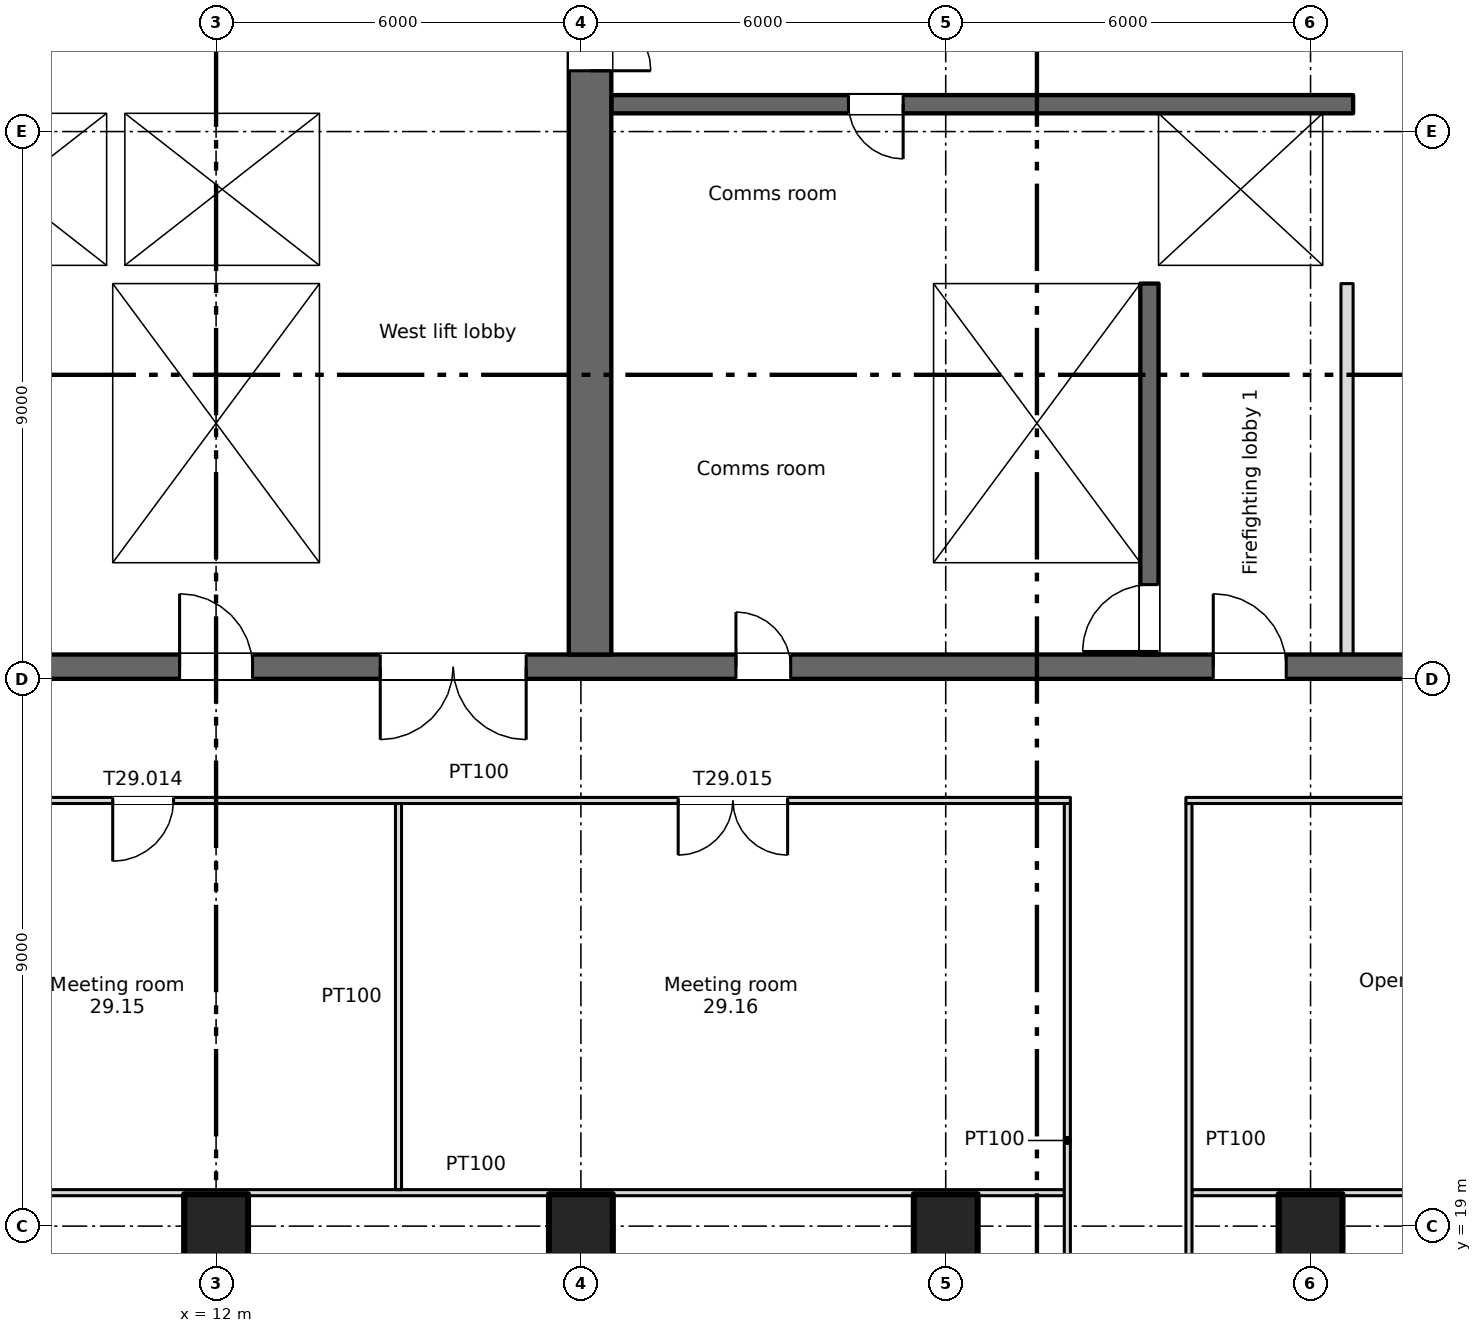
"""IFC4 building model, lengths in metres.
Left out: names, types, materials, properties, quantities, classifications, styles, units other than length and angle.
Written with IfcOpenShell. Run it as: python <this file> out.ifc"""

import sys

from ifc_helpers import new_model, si_unit, direction, frame, frame_2d, origin, origin_2d, place, context, subcontext, project, spatial, rectangle, extrude, element, fill, save


model = new_model("IFC4")
c1 = context("Model", 3, precision=1e-05, world=origin(), true_north=direction((0.0, 1.0)))
c2 = subcontext(c1, "Body", "Model", "MODEL_VIEW")
j1 = project(units=[si_unit("LENGTHUNIT", "METRE"), si_unit("PLANEANGLEUNIT", "RADIAN")], contexts=[c1])
p1 = place(None, origin())
s1 = spatial("IfcSite", under=j1, at=p1, CompositionType="ELEMENT")
p2 = place(p1, origin())
s2 = spatial("IfcBuilding", under=s1, at=p2, CompositionType="ELEMENT")
p3 = place(p2, frame((0.0, 0.0, 200.5)))
s3 = spatial("IfcBuildingStorey", under=s2, at=p3, CompositionType="ELEMENT", Elevation=200.5)
for number, where, z_axis, x_axis in (
    (1, (12.0, 19.0, 0.0), (0.0, 0.0, 1.0), (1.0, 0.0, 0.0)),
    (2, (18.0, 19.0, 0.0), (0.0, 0.0, 1.0), (1.0, 0.0, 0.0)),
    (3, (24.0, 19.0, 0.0), (0.0, 0.0, 1.0), (1.0, 0.0, 0.0)),
    (4, (30.0, 19.0, 0.0), (0.0, 0.0, 1.0), (1.0, 0.0, 0.0)),
):
    element("IfcColumn", number, at=place(p3, frame(where, z_axis=z_axis, x_axis=x_axis)), inside=s3, PredefinedType="COLUMN", context=c2, shape_type="SweptSolid", body=[
        extrude(rectangle(XDim=1.05, YDim=1.05, at=origin_2d()), origin(), (0.0, 0.0, 1.0), 3.35),
    ])
p4 = place(p3, frame((6.6, 28.2, 0.0), z_axis=(0.0, 0.0, 1.0), x_axis=(1.0, 0.0, 0.0)))
e5 = element("IfcWall", 5, at=p4, inside=s3, PredefinedType="SHEAR", context=c2, shape_type="SweptSolid", body=[
    extrude(rectangle(XDim=57.9, YDim=0.4, at=frame_2d((28.95, 0.0))), origin(), (0.0, 0.0, 1.0), 3.35),
])
p5 = place(p4, frame((13.95, 0.0, 0.0)))
e6 = element("IfcOpeningElement", 6, at=p5, cuts=e5, PredefinedType="OPENING", context=c2, shape_type="SweptSolid", body=[
    extrude(rectangle(XDim=0.9, YDim=2.1, at=frame_2d((0.45, 1.05))), frame((0.0, 0.21, 0.0), z_axis=(0.0, -1.0, 0.0), x_axis=(1.0, 0.0, 0.0)), (0.0, 0.0, 1.0), 0.42),
])
p6 = place(p4, frame((48.663, 0.0, 0.0)))
e7 = element("IfcOpeningElement", 7, at=p6, cuts=e5, PredefinedType="OPENING", context=c2, shape_type="SweptSolid", body=[
    extrude(rectangle(XDim=0.9, YDim=2.1, at=frame_2d((0.45, 1.05))), frame((0.0, 0.21, 0.0), z_axis=(0.0, -1.0, 0.0), x_axis=(1.0, 0.0, 0.0)), (0.0, 0.0, 1.0), 0.42),
])
p7 = place(p4, frame((51.238, 0.0, 0.0)))
e8 = element("IfcOpeningElement", 8, at=p7, cuts=e5, PredefinedType="OPENING", context=c2, shape_type="SweptSolid", body=[
    extrude(rectangle(XDim=0.9, YDim=2.1, at=frame_2d((0.45, 1.05))), frame((0.0, 0.21, 0.0), z_axis=(0.0, -1.0, 0.0), x_axis=(1.0, 0.0, 0.0)), (0.0, 0.0, 1.0), 0.42),
])
p8 = place(p4, frame((1.45, 0.0, 0.0)))
e9 = element("IfcOpeningElement", 9, at=p8, cuts=e5, PredefinedType="OPENING", context=c2, shape_type="SweptSolid", body=[
    extrude(rectangle(XDim=0.9, YDim=2.1, at=frame_2d((0.45, 1.05))), frame((0.0, 0.21, 0.0), z_axis=(0.0, -1.0, 0.0), x_axis=(1.0, 0.0, 0.0)), (0.0, 0.0, 1.0), 0.42),
])
p9 = place(p4, frame((4.8, 0.0, 0.0)))
e10 = element("IfcOpeningElement", 10, at=p9, cuts=e5, PredefinedType="OPENING", context=c2, shape_type="SweptSolid", body=[
    extrude(rectangle(XDim=1.2, YDim=2.1, at=frame_2d((0.6, 1.05))), frame((0.0, 0.21, 0.0), z_axis=(0.0, -1.0, 0.0), x_axis=(1.0, 0.0, 0.0)), (0.0, 0.0, 1.0), 0.42),
])
p10 = place(p4, frame((31.8, 0.0, 0.0)))
e11 = element("IfcOpeningElement", 11, at=p10, cuts=e5, PredefinedType="OPENING", context=c2, shape_type="SweptSolid", body=[
    extrude(rectangle(XDim=1.2, YDim=2.1, at=frame_2d((0.6, 1.05))), frame((0.0, 0.21, 0.0), z_axis=(0.0, -1.0, 0.0), x_axis=(1.0, 0.0, 0.0)), (0.0, 0.0, 1.0), 0.42),
])
p11 = place(p4, frame((55.3, 0.0, 0.0)))
e12 = element("IfcOpeningElement", 12, at=p11, cuts=e5, PredefinedType="OPENING", context=c2, shape_type="SweptSolid", body=[
    extrude(rectangle(XDim=1.2, YDim=2.1, at=frame_2d((0.6, 1.05))), frame((0.0, 0.21, 0.0), z_axis=(0.0, -1.0, 0.0), x_axis=(1.0, 0.0, 0.0)), (0.0, 0.0, 1.0), 0.42),
])
p12 = place(p4, frame((21.8, 0.0, 0.0)))
e13 = element("IfcOpeningElement", 13, at=p12, cuts=e5, PredefinedType="OPENING", context=c2, shape_type="SweptSolid", body=[
    extrude(rectangle(XDim=1.2, YDim=2.1, at=frame_2d((0.6, 1.05))), frame((0.0, 0.21, 0.0), z_axis=(0.0, -1.0, 0.0), x_axis=(1.0, 0.0, 0.0)), (0.0, 0.0, 1.0), 0.42),
])
p13 = place(p4, frame((41.8, 0.0, 0.0)))
e14 = element("IfcOpeningElement", 14, at=p13, cuts=e5, PredefinedType="OPENING", context=c2, shape_type="SweptSolid", body=[
    extrude(rectangle(XDim=1.2, YDim=2.1, at=frame_2d((0.6, 1.05))), frame((0.0, 0.21, 0.0), z_axis=(0.0, -1.0, 0.0), x_axis=(1.0, 0.0, 0.0)), (0.0, 0.0, 1.0), 0.42),
])
p14 = place(p4, frame((24.95, 0.0, 0.0)))
e15 = element("IfcOpeningElement", 15, at=p14, cuts=e5, PredefinedType="OPENING", context=c2, shape_type="SweptSolid", body=[
    extrude(rectangle(XDim=2.4, YDim=2.1, at=frame_2d((1.2, 1.05))), frame((0.0, 0.21, 0.0), z_axis=(0.0, -1.0, 0.0), x_axis=(1.0, 0.0, 0.0)), (0.0, 0.0, 1.0), 0.42),
])
p15 = place(p4, frame((37.45, 0.0, 0.0)))
e16 = element("IfcOpeningElement", 16, at=p15, cuts=e5, PredefinedType="OPENING", context=c2, shape_type="SweptSolid", body=[
    extrude(rectangle(XDim=2.4, YDim=2.1, at=frame_2d((1.2, 1.05))), frame((0.0, 0.21, 0.0), z_axis=(0.0, -1.0, 0.0), x_axis=(1.0, 0.0, 0.0)), (0.0, 0.0, 1.0), 0.42),
])
p16 = place(p4, frame((8.1, 0.0, 0.0)))
e17 = element("IfcOpeningElement", 17, at=p16, cuts=e5, PredefinedType="OPENING", context=c2, shape_type="SweptSolid", body=[
    extrude(rectangle(XDim=2.4, YDim=2.1, at=frame_2d((1.2, 1.05))), frame((0.0, 0.21, 0.0), z_axis=(0.0, -1.0, 0.0), x_axis=(1.0, 0.0, 0.0)), (0.0, 0.0, 1.0), 0.42),
])
p17 = place(p4, frame((28.95, 0.0, 0.0)))
e18 = element("IfcOpeningElement", 18, at=p17, cuts=e5, PredefinedType="OPENING", context=c2, shape_type="SweptSolid", body=[
    extrude(rectangle(XDim=0.9, YDim=2.1, at=frame_2d((0.45, 1.05))), frame((0.0, 0.21, 0.0), z_axis=(0.0, -1.0, 0.0), x_axis=(1.0, 0.0, 0.0)), (0.0, 0.0, 1.0), 0.42),
])
p18 = place(p4, frame((34.95, 0.0, 0.0)))
e19 = element("IfcOpeningElement", 19, at=p18, cuts=e5, PredefinedType="OPENING", context=c2, shape_type="SweptSolid", body=[
    extrude(rectangle(XDim=0.9, YDim=2.1, at=frame_2d((0.45, 1.05))), frame((0.0, 0.21, 0.0), z_axis=(0.0, -1.0, 0.0), x_axis=(1.0, 0.0, 0.0)), (0.0, 0.0, 1.0), 0.42),
])
p19 = place(p3, frame((18.15, 28.4, 0.0), z_axis=(0.0, 0.0, 1.0), x_axis=(0.0, 1.0, 0.0)))
e20 = element("IfcWall", 20, at=p19, inside=s3, PredefinedType="SHEAR", context=c2, shape_type="SweptSolid", body=[
    extrude(rectangle(XDim=16.9, YDim=0.7, at=frame_2d((8.45, 0.0))), origin(), (0.0, 0.0, 1.0), 3.35),
])
p20 = place(p19, frame((9.6, 0.0, 0.0)))
e21 = element("IfcOpeningElement", 21, at=p20, cuts=e20, PredefinedType="OPENING", context=c2, shape_type="SweptSolid", body=[
    extrude(rectangle(XDim=2.0, YDim=2.1, at=frame_2d((1.0, 1.05))), frame((0.0, 0.36, 0.0), z_axis=(0.0, -1.0, 0.0), x_axis=(1.0, 0.0, 0.0)), (0.0, 0.0, 1.0), 0.72),
])
p21 = place(p19, frame((15.4, 0.0, 0.0)))
e22 = element("IfcOpeningElement", 22, at=p21, cuts=e20, PredefinedType="OPENING", context=c2, shape_type="SweptSolid", body=[
    extrude(rectangle(XDim=1.2, YDim=2.1, at=frame_2d((0.6, 1.05))), frame((0.0, 0.36, 0.0), z_axis=(0.0, -1.0, 0.0), x_axis=(1.0, 0.0, 0.0)), (0.0, 0.0, 1.0), 0.72),
])
for number, where, z_axis, x_axis in (
    (23, (10.15, 28.4, 0.0), (0.0, 0.0, 1.0), (0.0, 1.0, 0.0)),
    (24, (13.85, 28.4, 0.0), (0.0, 0.0, 1.0), (0.0, 1.0, 0.0)),
    (25, (23.65, 28.4, 0.0), (0.0, 0.0, 1.0), (0.0, 1.0, 0.0)),
):
    element("IfcWall", number, at=place(p3, frame(where, z_axis=z_axis, x_axis=x_axis)), inside=s3, PredefinedType="SHEAR", context=c2, shape_type="SweptSolid", body=[
        extrude(rectangle(XDim=6.1, YDim=0.3, at=frame_2d((3.05, 0.0))), origin(), (0.0, 0.0, 1.0), 3.35),
    ])
p22 = place(p3, frame((27.35, 28.4, 0.0), z_axis=(0.0, 0.0, 1.0), x_axis=(0.0, 1.0, 0.0)))
e26 = element("IfcWall", 26, at=p22, inside=s3, PredefinedType="SHEAR", context=c2, shape_type="SweptSolid", body=[
    extrude(rectangle(XDim=6.1, YDim=0.3, at=frame_2d((3.05, 0.0))), origin(), (0.0, 0.0, 1.0), 3.35),
])
p23 = place(p22, frame((0.05, 0.0, 0.0)))
e27 = element("IfcOpeningElement", 27, at=p23, cuts=e26, PredefinedType="OPENING", context=c2, shape_type="SweptSolid", body=[
    extrude(rectangle(XDim=1.1, YDim=2.1, at=frame_2d((0.55, 1.05))), frame((0.0, 0.16, 0.0), z_axis=(0.0, -1.0, 0.0), x_axis=(1.0, 0.0, 0.0)), (0.0, 0.0, 1.0), 0.32),
])
p24 = place(p3, frame((7.0, 34.65, 0.0), z_axis=(0.0, 0.0, 1.0), x_axis=(1.0, 0.0, 0.0)))
e28 = element("IfcWall", 28, at=p24, inside=s3, PredefinedType="SHEAR", context=c2, shape_type="SweptSolid", body=[
    extrude(rectangle(XDim=7.0, YDim=0.3, at=frame_2d((3.5, 0.0))), origin(), (0.0, 0.0, 1.0), 3.35),
])
p25 = place(p3, frame((18.5, 34.65, 0.0), z_axis=(0.0, 0.0, 1.0), x_axis=(1.0, 0.0, 0.0)))
e29 = element("IfcWall", 29, at=p25, inside=s3, PredefinedType="SHEAR", context=c2, shape_type="SweptSolid", body=[
    extrude(rectangle(XDim=12.2, YDim=0.3, at=frame_2d((6.1, 0.0))), origin(), (0.0, 0.0, 1.0), 3.35),
])
p26 = place(p25, frame((9.8, 0.0, 0.0)))
e30 = element("IfcOpeningElement", 30, at=p26, cuts=e29, PredefinedType="OPENING", context=c2, shape_type="SweptSolid", body=[
    extrude(rectangle(XDim=1.1, YDim=2.1, at=frame_2d((0.55, 1.05))), frame((0.0, 0.16, 0.0), z_axis=(0.0, -1.0, 0.0), x_axis=(1.0, 0.0, 0.0)), (0.0, 0.0, 1.0), 0.32),
])
p27 = place(p3, frame((7.0, 37.45, 0.0), z_axis=(0.0, 0.0, 1.0), x_axis=(1.0, 0.0, 0.0)))
e31 = element("IfcWall", 31, at=p27, inside=s3, PredefinedType="SHEAR", context=c2, shape_type="SweptSolid", body=[
    extrude(rectangle(XDim=7.0, YDim=0.3, at=frame_2d((3.5, 0.0))), origin(), (0.0, 0.0, 1.0), 3.35),
])
p28 = place(p3, frame((30.7, 37.45, 0.0), z_axis=(0.0, 0.0, 1.0), x_axis=(-1.0, 0.0, 0.0)))
e32 = element("IfcWall", 32, at=p28, inside=s3, PredefinedType="SHEAR", context=c2, shape_type="SweptSolid", body=[
    extrude(rectangle(XDim=12.2, YDim=0.3, at=frame_2d((6.1, 0.0))), origin(), (0.0, 0.0, 1.0), 3.35),
])
p29 = place(p28, frame((7.4, 0.0, 0.0)))
e33 = element("IfcOpeningElement", 33, at=p29, cuts=e32, PredefinedType="OPENING", context=c2, shape_type="SweptSolid", body=[
    extrude(rectangle(XDim=0.9, YDim=2.1, at=frame_2d((0.45, 1.05))), frame((0.0, 0.16, 0.0), z_axis=(0.0, -1.0, 0.0), x_axis=(1.0, 0.0, 0.0)), (0.0, 0.0, 1.0), 0.32),
])
p30 = place(p3, frame((27.35, 34.8, 0.0), z_axis=(0.0, 0.0, 1.0), x_axis=(0.0, 1.0, 0.0)))
e34 = element("IfcWall", 34, at=p30, inside=s3, PredefinedType="SHEAR", context=c2, shape_type="SweptSolid", body=[
    extrude(rectangle(XDim=2.5, YDim=0.3, at=frame_2d((1.25, 0.0))), origin(), (0.0, 0.0, 1.0), 3.35),
])
p31 = place(p3, frame((30.45, 34.8, 0.0), z_axis=(0.0, 0.0, 1.0), x_axis=(0.0, 1.0, 0.0)))
e35 = element("IfcWall", 35, at=p31, inside=s3, PredefinedType="SHEAR", context=c2, shape_type="SweptSolid", body=[
    extrude(rectangle(XDim=2.5, YDim=0.5, at=frame_2d((1.25, 0.0))), origin(), (0.0, 0.0, 1.0), 3.35),
])
for number, where, z_axis, x_axis in (
    (36, (13.85, 34.8, 0.0), (0.0, 0.0, 1.0), (0.0, 1.0, 0.0)),
    (37, (10.35, 34.8, 0.0), (0.0, 0.0, 1.0), (0.0, 1.0, 0.0)),
):
    element("IfcWall", number, at=place(p3, frame(where, z_axis=z_axis, x_axis=x_axis)), inside=s3, PredefinedType="SHEAR", context=c2, shape_type="SweptSolid", body=[
        extrude(rectangle(XDim=2.5, YDim=0.3, at=frame_2d((1.25, 0.0))), origin(), (0.0, 0.0, 1.0), 3.35),
    ])
p32 = place(p3, frame((30.6, 28.4, 0.0), z_axis=(0.0, 0.0, 1.0), x_axis=(0.0, 1.0, 0.0)))
e38 = element("IfcWall", 38, at=p32, inside=s3, PredefinedType="PARTITIONING", context=c2, shape_type="SweptSolid", body=[
    extrude(rectangle(XDim=6.1, YDim=0.2, at=frame_2d((3.05, 0.0))), origin(), (0.0, 0.0, 1.0), 3.35),
])
p33 = place(p3, frame((6.6, 19.55, 0.0), z_axis=(0.0, 0.0, 1.0), x_axis=(1.0, 0.0, 0.0)))
e39 = element("IfcWall", 39, at=p33, inside=s3, PredefinedType="PARTITIONING", context=c2, shape_type="SweptSolid", body=[
    extrude(rectangle(XDim=19.35, YDim=0.1, at=frame_2d((9.675, 0.0))), origin(), (0.0, 0.0, 1.0), 3.35),
])
p34 = place(p3, frame((28.05, 19.55, 0.0), z_axis=(0.0, 0.0, 1.0), x_axis=(1.0, 0.0, 0.0)))
e40 = element("IfcWall", 40, at=p34, inside=s3, PredefinedType="PARTITIONING", context=c2, shape_type="SweptSolid", body=[
    extrude(rectangle(XDim=21.9, YDim=0.1, at=frame_2d((10.95, 0.0))), origin(), (0.0, 0.0, 1.0), 3.35),
])
p35 = place(p3, frame((6.6, 26.0, 0.0), z_axis=(0.0, 0.0, 1.0), x_axis=(1.0, 0.0, 0.0)))
e41 = element("IfcWall", 41, at=p35, inside=s3, PredefinedType="PARTITIONING", context=c2, shape_type="SweptSolid", body=[
    extrude(rectangle(XDim=19.45, YDim=0.1, at=frame_2d((9.725, 0.0))), origin(), (0.0, 0.0, 1.0), 3.35),
])
p36 = place(p35, frame((3.7, 0.0, 0.0)))
e42 = element("IfcOpeningElement", 42, at=p36, cuts=e41, PredefinedType="OPENING", context=c2, shape_type="SweptSolid", body=[
    extrude(rectangle(XDim=1.0, YDim=2.1, at=frame_2d((0.5, 1.05))), frame((0.0, 0.06, 0.0), z_axis=(0.0, -1.0, 0.0), x_axis=(1.0, 0.0, 0.0)), (0.0, 0.0, 1.0), 0.12),
])
p37 = place(p35, frame((13.0, 0.0, 0.0)))
e43 = element("IfcOpeningElement", 43, at=p37, cuts=e41, PredefinedType="OPENING", context=c2, shape_type="SweptSolid", body=[
    extrude(rectangle(XDim=1.8, YDim=2.1, at=frame_2d((0.9, 1.05))), frame((0.0, 0.06, 0.0), z_axis=(0.0, -1.0, 0.0), x_axis=(1.0, 0.0, 0.0)), (0.0, 0.0, 1.0), 0.12),
])
p38 = place(p3, frame((27.95, 26.0, 0.0), z_axis=(0.0, 0.0, 1.0), x_axis=(1.0, 0.0, 0.0)))
e44 = element("IfcWall", 44, at=p38, inside=s3, PredefinedType="PARTITIONING", context=c2, shape_type="SweptSolid", body=[
    extrude(rectangle(XDim=22.1, YDim=0.1, at=frame_2d((11.05, 0.0))), origin(), (0.0, 0.0, 1.0), 3.35),
])
p39 = place(p38, frame((10.15, 0.0, 0.0)))
e45 = element("IfcOpeningElement", 45, at=p39, cuts=e44, PredefinedType="OPENING", context=c2, shape_type="SweptSolid", body=[
    extrude(rectangle(XDim=1.8, YDim=2.1, at=frame_2d((0.9, 1.05))), frame((0.0, 0.06, 0.0), z_axis=(0.0, -1.0, 0.0), x_axis=(1.0, 0.0, 0.0)), (0.0, 0.0, 1.0), 0.12),
])
p40 = place(p3, frame((15.0, 19.6, 0.0), z_axis=(0.0, 0.0, 1.0), x_axis=(0.0, 1.0, 0.0)))
e46 = element("IfcWall", 46, at=p40, inside=s3, PredefinedType="PARTITIONING", context=c2, shape_type="SweptSolid", body=[
    extrude(rectangle(XDim=6.35, YDim=0.1, at=frame_2d((3.175, 0.0))), origin(), (0.0, 0.0, 1.0), 3.35),
])
for number, where, z_axis, x_axis in (
    (47, (26.0, 12.65, 0.0), (0.0, 0.0, 1.0), (0.0, 1.0, 0.0)),
    (48, (28.0, 12.65, 0.0), (0.0, 0.0, 1.0), (0.0, 1.0, 0.0)),
):
    element("IfcWall", number, at=place(p3, frame(where, z_axis=z_axis, x_axis=x_axis)), inside=s3, PredefinedType="PARTITIONING", context=c2, shape_type="SweptSolid", body=[
        extrude(rectangle(XDim=13.3, YDim=0.1, at=frame_2d((6.65, 0.0))), origin(), (0.0, 0.0, 1.0), 3.35),
    ])
p41 = place(p5, origin())
e49 = element("IfcDoor", 49, at=p41, inside=s3, OperationType="SINGLE_SWING_LEFT", PredefinedType="DOOR", context=c2, shape_type="SweptSolid", body=[
    extrude(rectangle(XDim=0.9, YDim=2.1, at=frame_2d((0.45, 1.05))), frame((0.0, 0.025, 0.0), z_axis=(0.0, -1.0, 0.0), x_axis=(1.0, 0.0, 0.0)), (0.0, 0.0, 1.0), 0.05),
])
fill(e6, e49)
p42 = place(p29, origin())
e50 = element("IfcDoor", 50, at=p42, inside=s3, OperationType="SINGLE_SWING_LEFT", PredefinedType="DOOR", context=c2, shape_type="SweptSolid", body=[
    extrude(rectangle(XDim=0.9, YDim=2.1, at=frame_2d((0.45, 1.05))), frame((0.0, 0.025, 0.0), z_axis=(0.0, -1.0, 0.0), x_axis=(1.0, 0.0, 0.0)), (0.0, 0.0, 1.0), 0.05),
])
fill(e33, e50)
p43 = place(p26, origin())
e51 = element("IfcDoor", 51, at=p43, inside=s3, OperationType="SLIDING_TO_LEFT", PredefinedType="DOOR", context=c2, shape_type="SweptSolid", body=[
    extrude(rectangle(XDim=1.1, YDim=2.1, at=frame_2d((0.55, 1.05))), frame((0.0, 0.025, 0.0), z_axis=(0.0, -1.0, 0.0), x_axis=(1.0, 0.0, 0.0)), (0.0, 0.0, 1.0), 0.05),
])
fill(e30, e51)
p44 = place(p9, origin())
e52 = element("IfcDoor", 52, at=p44, inside=s3, OperationType="SINGLE_SWING_LEFT", PredefinedType="DOOR", context=c2, shape_type="SweptSolid", body=[
    extrude(rectangle(XDim=1.2, YDim=2.1, at=frame_2d((0.6, 1.05))), frame((0.0, 0.025, 0.0), z_axis=(0.0, -1.0, 0.0), x_axis=(1.0, 0.0, 0.0)), (0.0, 0.0, 1.0), 0.05),
])
fill(e10, e52)
p45 = place(p23, origin())
e53 = element("IfcDoor", 53, at=p45, inside=s3, OperationType="SINGLE_SWING_LEFT", PredefinedType="DOOR", context=c2, shape_type="SweptSolid", body=[
    extrude(rectangle(XDim=1.1, YDim=2.1, at=frame_2d((0.55, 1.05))), frame((0.0, 0.025, 0.0), z_axis=(0.0, -1.0, 0.0), x_axis=(1.0, 0.0, 0.0)), (0.0, 0.0, 1.0), 0.05),
])
fill(e27, e53)
p46 = place(p12, origin())
e54 = element("IfcDoor", 54, at=p46, inside=s3, OperationType="SINGLE_SWING_LEFT", PredefinedType="DOOR", context=c2, shape_type="SweptSolid", body=[
    extrude(rectangle(XDim=1.2, YDim=2.1, at=frame_2d((0.6, 1.05))), frame((0.0, 0.025, 0.0), z_axis=(0.0, -1.0, 0.0), x_axis=(1.0, 0.0, 0.0)), (0.0, 0.0, 1.0), 0.05),
])
fill(e13, e54)
p47 = place(p16, origin())
e55 = element("IfcDoor", 55, at=p47, inside=s3, OperationType="DOUBLE_DOOR_SINGLE_SWING", PredefinedType="DOOR", context=c2, shape_type="SweptSolid", body=[
    extrude(rectangle(XDim=2.4, YDim=2.1, at=frame_2d((1.2, 1.05))), frame((0.0, 0.025, 0.0), z_axis=(0.0, -1.0, 0.0), x_axis=(1.0, 0.0, 0.0)), (0.0, 0.0, 1.0), 0.05),
])
fill(e17, e55)
p48 = place(p20, origin())
e56 = element("IfcDoor", 56, at=p48, inside=s3, OperationType="DOUBLE_DOOR_SINGLE_SWING", PredefinedType="DOOR", context=c2, shape_type="SweptSolid", body=[
    extrude(rectangle(XDim=2.0, YDim=2.1, at=frame_2d((1.0, 1.05))), frame((0.0, 0.025, 0.0), z_axis=(0.0, -1.0, 0.0), x_axis=(1.0, 0.0, 0.0)), (0.0, 0.0, 1.0), 0.05),
])
fill(e21, e56)
p49 = place(p36, origin())
e57 = element("IfcDoor", 57, at=p49, inside=s3, OperationType="SINGLE_SWING_LEFT", PredefinedType="DOOR", context=c2, shape_type="SweptSolid", body=[
    extrude(rectangle(XDim=1.0, YDim=2.1, at=frame_2d((0.5, 1.05))), frame((0.0, 0.025, 0.0), z_axis=(0.0, -1.0, 0.0), x_axis=(1.0, 0.0, 0.0)), (0.0, 0.0, 1.0), 0.05),
])
fill(e42, e57)
p50 = place(p37, origin())
e58 = element("IfcDoor", 58, at=p50, inside=s3, OperationType="DOUBLE_DOOR_SINGLE_SWING", PredefinedType="DOOR", context=c2, shape_type="SweptSolid", body=[
    extrude(rectangle(XDim=1.8, YDim=2.1, at=frame_2d((0.9, 1.05))), frame((0.0, 0.025, 0.0), z_axis=(0.0, -1.0, 0.0), x_axis=(1.0, 0.0, 0.0)), (0.0, 0.0, 1.0), 0.05),
])
fill(e43, e58)
save(model, sys.argv[1])
